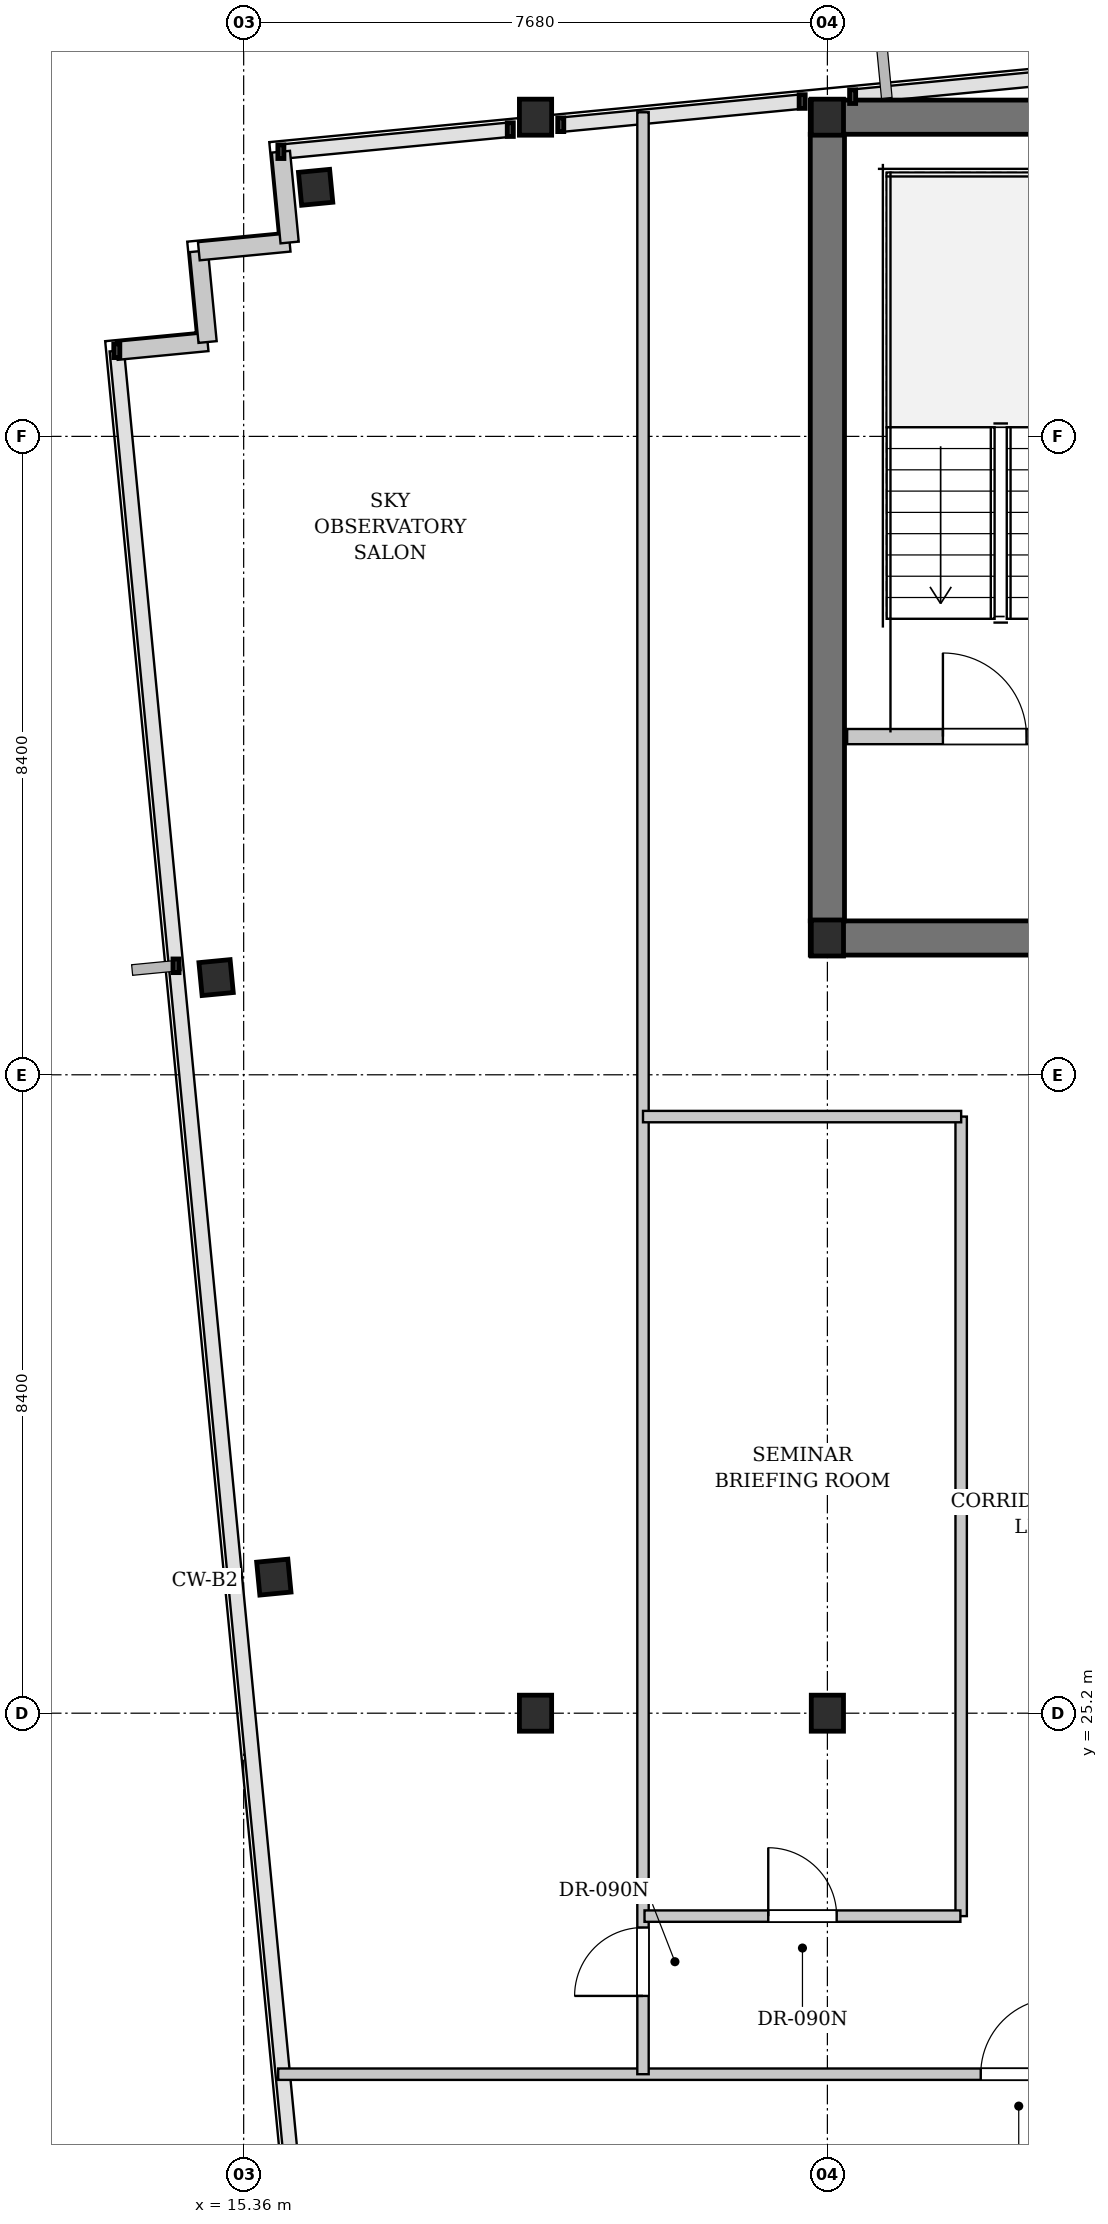
"""IFC4 building model, lengths in metres.
Left out: names, types, materials, properties, quantities, classifications, styles, units other than length and angle.
Written with IfcOpenShell. Run it as: python <this file> out.ifc"""

import sys

from ifc_helpers import new_model, si_unit, direction, frame, frame_2d, origin, origin_2d, place, context, subcontext, project, spatial, rectangle, i_section, extrude, element, fill, save


model = new_model("IFC4")
c1 = context("Model", 3, precision=1e-05, world=origin(), true_north=direction((0.0, 1.0)))
c2 = subcontext(c1, "Body", "Model", "MODEL_VIEW")
j1 = project(units=[si_unit("LENGTHUNIT", "METRE"), si_unit("PLANEANGLEUNIT", "RADIAN")], contexts=[c1])
p1 = place(None, origin())
s1 = spatial("IfcSite", under=j1, at=p1, CompositionType="ELEMENT")
p2 = place(p1, origin())
s2 = spatial("IfcBuilding", under=s1, at=p2, CompositionType="ELEMENT")
p3 = place(p2, frame((0.0, 0.0, 123.7)))
s3 = spatial("IfcBuildingStorey", under=s2, at=p3, CompositionType="ELEMENT", Elevation=123.7)
p4 = place(p3, frame((22.815, 46.2, 0.0), z_axis=(0.0, 0.0, 1.0), x_axis=(1.0, 0.0, 0.0)))
e1 = element("IfcWall", 1, at=p4, inside=s3, PredefinedType="SHEAR", context=c2, shape_type="SweptSolid", body=[
    extrude(rectangle(XDim=31.17, YDim=0.45, at=frame_2d((15.585, 0.0))), origin(), (0.0, 0.0, 1.0), 3.18),
])
p5 = place(p3, frame((22.815, 35.4, 0.0), z_axis=(0.0, 0.0, 1.0), x_axis=(1.0, 0.0, 0.0)))
e2 = element("IfcWall", 2, at=p5, inside=s3, PredefinedType="SHEAR", context=c2, shape_type="SweptSolid", body=[
    extrude(rectangle(XDim=5.385, YDim=0.45, at=frame_2d((2.692, 0.0))), origin(), (0.0, 0.0, 1.0), 3.18),
])
p6 = place(p3, frame((23.04, 35.625, 0.0), z_axis=(0.0, 0.0, 1.0), x_axis=(0.0, 1.0, 0.0)))
e3 = element("IfcWall", 3, at=p6, inside=s3, PredefinedType="SHEAR", context=c2, shape_type="SweptSolid", body=[
    extrude(rectangle(XDim=10.35, YDim=0.45, at=frame_2d((5.175, 0.0))), origin(), (0.0, 0.0, 1.0), 3.18),
])
for number, where, z_axis, x_axis in (
    (4, (23.04, 35.4, 0.0), (0.0, 0.0, 1.0), (1.0, 0.0, 0.0)),
    (5, (23.04, 46.2, 0.0), (0.0, 0.0, 1.0), (1.0, 0.0, 0.0)),
    (6, (23.04, 25.2, 0.0), (0.0, 0.0, 1.0), (1.0, 0.0, 0.0)),
    (7, (19.2, 25.2, 0.0), (0.0, 0.0, 1.0), (1.0, 0.0, 0.0)),
    (8, (19.2, 46.2, 0.0), (0.0, 0.0, 1.0), (1.0, 0.0, 0.0)),
):
    element("IfcColumn", number, at=place(p3, frame(where, z_axis=z_axis, x_axis=x_axis)), inside=s3, PredefinedType="COLUMN", context=c2, shape_type="SweptSolid", body=[
        extrude(i_section(OverallWidth=0.424, OverallDepth=0.474, WebThickness=0.047, FlangeThickness=0.077, FilletRadius=0.015, at=origin_2d()), origin(), (0.0, 0.0, 1.0), 3.4),
    ])
for number, where, z_axis, x_axis in (
    (9, (16.307, 45.277, 0.0), (0.0, 0.0, 1.0), (0.995, 0.096, 0.0)),
    (10, (15.757, 26.99, 0.0), (0.0, 0.0, 1.0), (0.995, 0.096, 0.0)),
    (11, (14.997, 34.879, 0.0), (0.0, 0.0, 1.0), (0.995, 0.096, 0.0)),
):
    element("IfcColumn", number, at=place(p3, frame(where, z_axis=z_axis, x_axis=x_axis)), inside=s3, PredefinedType="COLUMN", context=c2, shape_type="SweptSolid", body=[
        extrude(i_section(OverallWidth=0.412, OverallDepth=0.435, WebThickness=0.036, FlangeThickness=0.058, FilletRadius=0.015, at=origin_2d()), origin(), (0.0, 0.0, 1.0), 3.4),
    ])
for number, where, z_axis, x_axis in (
    (12, (13.691, 43.127, 0.0), (0.0, 0.0, 1.0), (0.995, 0.096, 0.0)),
    (13, (14.885, 43.242, 0.0), (0.0, 0.0, 1.0), (-0.096, 0.995, 0.0)),
):
    element("IfcWall", number, at=place(p3, frame(where, z_axis=z_axis, x_axis=x_axis)), inside=s3, PredefinedType="SOLIDWALL", context=c2, shape_type="SweptSolid", body=[
        extrude(rectangle(XDim=1.2, YDim=0.24, at=frame_2d((0.6, 0.0))), origin(), (0.0, 0.0, 1.0), 3.18),
    ])
for number, where, z_axis, x_axis in (
    (14, (14.771, 44.436, 0.0), (0.0, 0.0, 1.0), (0.995, 0.096, 0.0)),
    (15, (15.965, 44.551, 0.0), (0.0, 0.0, 1.0), (-0.096, 0.995, 0.0)),
):
    element("IfcWall", number, at=place(p3, frame(where, z_axis=z_axis, x_axis=x_axis)), inside=s3, PredefinedType="SOLIDWALL", context=c2, shape_type="SweptSolid", body=[
        extrude(rectangle(XDim=1.2, YDim=0.24, at=frame_2d((0.6, 0.0))), origin(), (0.0, 0.0, 1.0), 3.18),
    ])
p7 = place(p3, frame((23.3, 38.05, 0.0), z_axis=(0.0, 0.0, 1.0), x_axis=(1.0, 0.0, 0.0)))
e16 = element("IfcWall", 16, at=p7, inside=s3, PredefinedType="PARTITIONING", context=c2, shape_type="SweptSolid", body=[
    extrude(rectangle(XDim=3.62, YDim=0.2, at=frame_2d((1.81, 0.0))), origin(), (0.0, 0.0, 1.0), 3.18),
])
p8 = place(p7, frame((1.26, 0.0, 0.0)))
e17 = element("IfcOpeningElement", 17, at=p8, cuts=e16, PredefinedType="OPENING", context=c2, shape_type="SweptSolid", body=[
    extrude(rectangle(XDim=1.1, YDim=2.15, at=frame_2d((0.55, 1.075))), frame((0.0, 0.11, 0.0), z_axis=(0.0, -1.0, 0.0), x_axis=(1.0, 0.0, 0.0)), (0.0, 0.0, 1.0), 0.22),
])
p9 = place(p3, frame((15.814, 20.45, 0.0), z_axis=(0.0, 0.0, 1.0), x_axis=(1.0, 0.0, 0.0)))
e18 = element("IfcWall", 18, at=p9, inside=s3, PredefinedType="PARTITIONING", context=c2, shape_type="SweptSolid", body=[
    extrude(rectangle(XDim=61.222, YDim=0.15, at=frame_2d((30.611, 0.0))), origin(), (0.0, 0.0, 1.0), 3.18),
])
p10 = place(p9, frame((9.243, 0.0, 0.0)))
e19 = element("IfcOpeningElement", 19, at=p10, cuts=e18, PredefinedType="OPENING", context=c2, shape_type="SweptSolid", body=[
    extrude(rectangle(XDim=1.0, YDim=2.15, at=frame_2d((0.5, 1.075))), frame((0.0, 0.085, 0.0), z_axis=(0.0, -1.0, 0.0), x_axis=(1.0, 0.0, 0.0)), (0.0, 0.0, 1.0), 0.17),
])
p11 = place(p9, frame((19.674, 0.0, 0.0)))
e20 = element("IfcOpeningElement", 20, at=p11, cuts=e18, PredefinedType="OPENING", context=c2, shape_type="SweptSolid", body=[
    extrude(rectangle(XDim=1.0, YDim=2.15, at=frame_2d((0.5, 1.075))), frame((0.0, 0.085, 0.0), z_axis=(0.0, -1.0, 0.0), x_axis=(1.0, 0.0, 0.0)), (0.0, 0.0, 1.0), 0.17),
])
p12 = place(p9, frame((30.647, 0.0, 0.0)))
e21 = element("IfcOpeningElement", 21, at=p12, cuts=e18, PredefinedType="OPENING", context=c2, shape_type="SweptSolid", body=[
    extrude(rectangle(XDim=1.0, YDim=2.15, at=frame_2d((0.5, 1.075))), frame((0.0, 0.085, 0.0), z_axis=(0.0, -1.0, 0.0), x_axis=(1.0, 0.0, 0.0)), (0.0, 0.0, 1.0), 0.17),
])
p13 = place(p9, frame((40.021, 0.0, 0.0)))
e22 = element("IfcOpeningElement", 22, at=p13, cuts=e18, PredefinedType="OPENING", context=c2, shape_type="SweptSolid", body=[
    extrude(rectangle(XDim=1.0, YDim=2.15, at=frame_2d((0.5, 1.075))), frame((0.0, 0.085, 0.0), z_axis=(0.0, -1.0, 0.0), x_axis=(1.0, 0.0, 0.0)), (0.0, 0.0, 1.0), 0.17),
])
p14 = place(p9, frame((48.914, 0.0, 0.0)))
e23 = element("IfcOpeningElement", 23, at=p14, cuts=e18, PredefinedType="OPENING", context=c2, shape_type="SweptSolid", body=[
    extrude(rectangle(XDim=1.0, YDim=2.15, at=frame_2d((0.5, 1.075))), frame((0.0, 0.085, 0.0), z_axis=(0.0, -1.0, 0.0), x_axis=(1.0, 0.0, 0.0)), (0.0, 0.0, 1.0), 0.17),
])
p15 = place(p3, frame((20.614, 20.45, 0.0), z_axis=(0.0, 0.0, 1.0), x_axis=(0.0, 1.0, 0.0)))
e24 = element("IfcWall", 24, at=p15, inside=s3, PredefinedType="PARTITIONING", context=c2, shape_type="SweptSolid", body=[
    extrude(rectangle(XDim=25.815, YDim=0.15, at=frame_2d((12.907, 0.0))), origin(), (0.0, 0.0, 1.0), 3.18),
])
p16 = place(p15, frame((1.03, 0.0, 0.0)))
e25 = element("IfcOpeningElement", 25, at=p16, cuts=e24, PredefinedType="OPENING", context=c2, shape_type="SweptSolid", body=[
    extrude(rectangle(XDim=0.9, YDim=2.15, at=frame_2d((0.45, 1.075))), frame((0.0, 0.085, 0.0), z_axis=(0.0, -1.0, 0.0), x_axis=(1.0, 0.0, 0.0)), (0.0, 0.0, 1.0), 0.17),
])
p17 = place(p3, frame((24.8, 22.53, 0.0), z_axis=(0.0, 0.0, 1.0), x_axis=(0.0, 1.0, 0.0)))
e26 = element("IfcWall", 26, at=p17, inside=s3, PredefinedType="PARTITIONING", context=c2, shape_type="SweptSolid", body=[
    extrude(rectangle(XDim=10.52, YDim=0.15, at=frame_2d((5.26, 0.0))), origin(), (0.0, 0.0, 1.0), 3.18),
])
p18 = place(p3, frame((20.614, 33.05, 0.0), z_axis=(0.0, 0.0, 1.0), x_axis=(1.0, 0.0, 0.0)))
e27 = element("IfcWall", 27, at=p18, inside=s3, PredefinedType="PARTITIONING", context=c2, shape_type="SweptSolid", body=[
    extrude(rectangle(XDim=4.186, YDim=0.15, at=frame_2d((2.093, 0.0))), origin(), (0.0, 0.0, 1.0), 3.18),
])
p19 = place(p3, frame((20.634, 22.53, 0.0), z_axis=(0.0, 0.0, 1.0), x_axis=(1.0, 0.0, 0.0)))
e28 = element("IfcWall", 28, at=p19, inside=s3, PredefinedType="PARTITIONING", context=c2, shape_type="SweptSolid", body=[
    extrude(rectangle(XDim=4.156, YDim=0.15, at=frame_2d((2.078, 0.0))), origin(), (0.0, 0.0, 1.0), 3.18),
])
p20 = place(p19, frame((1.628, 0.0, 0.0)))
e29 = element("IfcOpeningElement", 29, at=p20, cuts=e28, PredefinedType="OPENING", context=c2, shape_type="SweptSolid", body=[
    extrude(rectangle(XDim=0.9, YDim=2.15, at=frame_2d((0.45, 1.075))), frame((0.0, 0.085, 0.0), z_axis=(0.0, -1.0, 0.0), x_axis=(1.0, 0.0, 0.0)), (0.0, 0.0, 1.0), 0.17),
])
p21 = place(p8, origin())
e30 = element("IfcDoor", 30, at=p21, inside=s3, OperationType="SINGLE_SWING_LEFT", PredefinedType="DOOR", context=c2, shape_type="SweptSolid", body=[
    extrude(rectangle(XDim=1.1, YDim=2.15, at=frame_2d((0.55, 1.075))), frame((0.0, 0.025, 0.0), z_axis=(0.0, -1.0, 0.0), x_axis=(1.0, 0.0, 0.0)), (0.0, 0.0, 1.0), 0.05),
])
fill(e17, e30)
p22 = place(p10, origin())
e31 = element("IfcDoor", 31, at=p22, inside=s3, OperationType="SINGLE_SWING_RIGHT", PredefinedType="DOOR", context=c2, shape_type="SweptSolid", body=[
    extrude(rectangle(XDim=1.0, YDim=2.15, at=frame_2d((0.5, 1.075))), frame((0.0, 0.025, 0.0), z_axis=(0.0, -1.0, 0.0), x_axis=(1.0, 0.0, 0.0)), (0.0, 0.0, 1.0), 0.05),
])
fill(e19, e31)
p23 = place(p16, origin())
e32 = element("IfcDoor", 32, at=p23, inside=s3, OperationType="SINGLE_SWING_LEFT", PredefinedType="DOOR", context=c2, shape_type="SweptSolid", body=[
    extrude(rectangle(XDim=0.9, YDim=2.15, at=frame_2d((0.45, 1.075))), frame((0.0, 0.025, 0.0), z_axis=(0.0, -1.0, 0.0), x_axis=(1.0, 0.0, 0.0)), (0.0, 0.0, 1.0), 0.05),
])
fill(e25, e32)
p24 = place(p20, origin())
e33 = element("IfcDoor", 33, at=p24, inside=s3, OperationType="SINGLE_SWING_LEFT", PredefinedType="DOOR", context=c2, shape_type="SweptSolid", body=[
    extrude(rectangle(XDim=0.9, YDim=2.15, at=frame_2d((0.45, 1.075))), frame((0.0, 0.025, 0.0), z_axis=(0.0, -1.0, 0.0), x_axis=(1.0, 0.0, 0.0)), (0.0, 0.0, 1.0), 0.05),
])
fill(e29, e33)
save(model, sys.argv[1])
